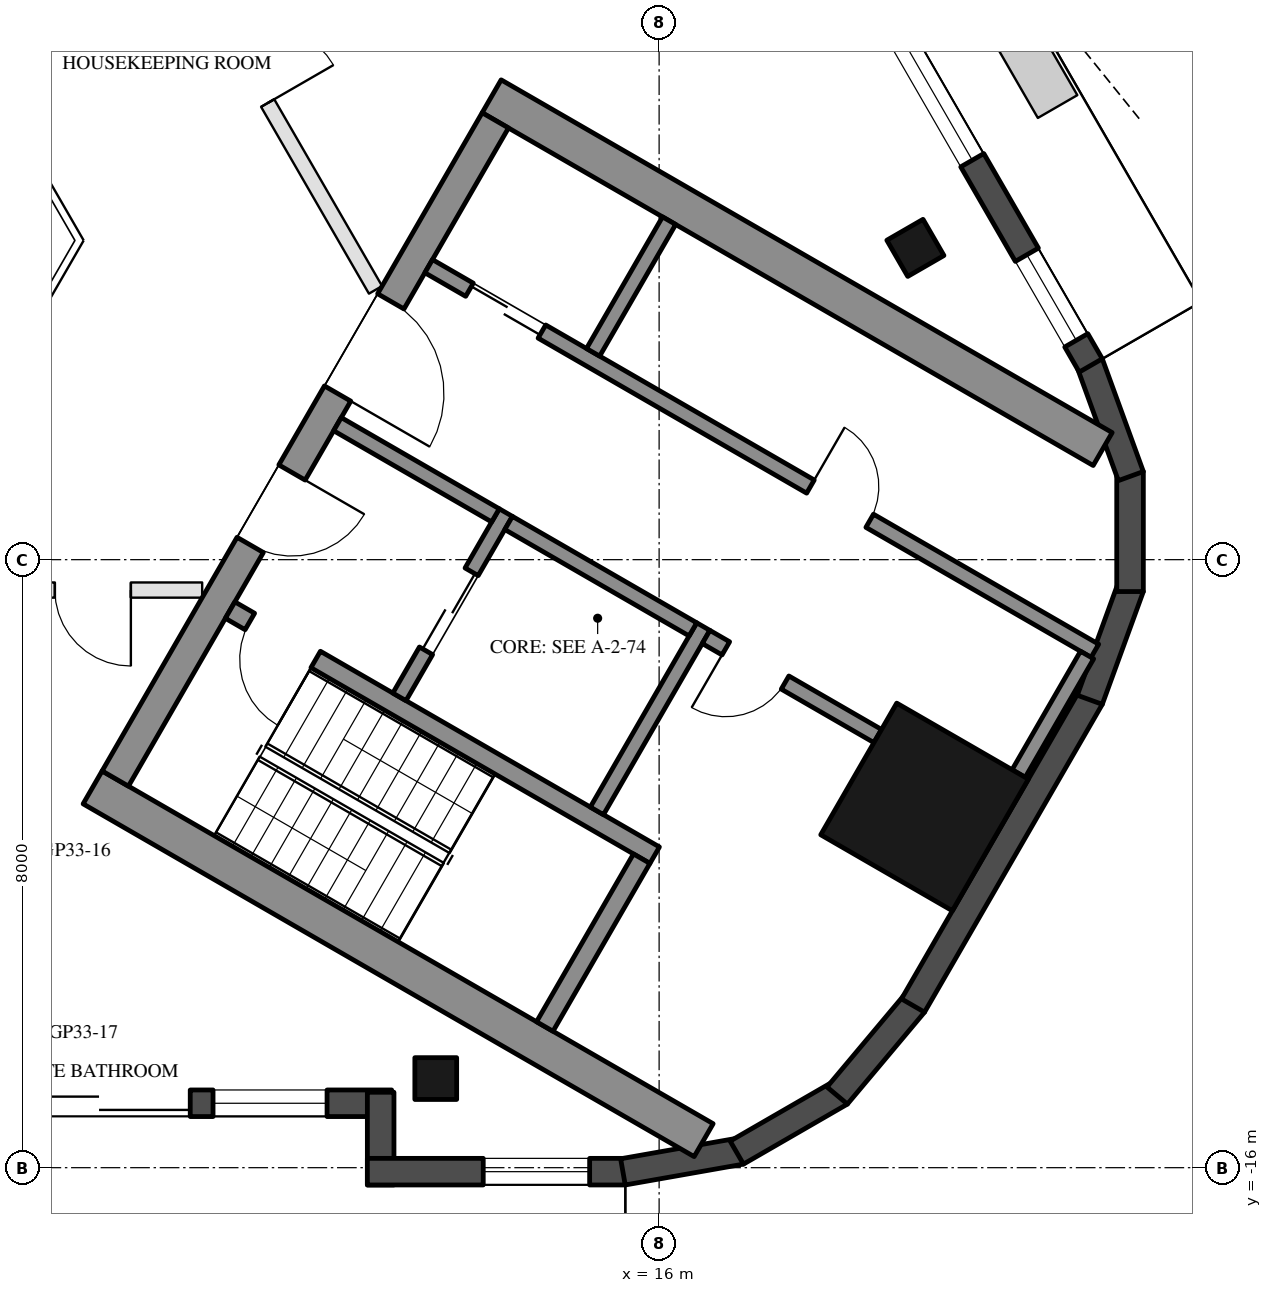
"""IFC4 building model, lengths in metres.
Left out: names, types, materials, properties, quantities, classifications, styles, units other than length and angle.
Written with IfcOpenShell. Run it as: python <this file> out.ifc"""

import sys

from ifc_helpers import new_model, si_unit, direction, frame, frame_2d, origin, origin_2d, place, context, subcontext, project, spatial, rectangle, hollow_rectangle, extrude, boolean, halfspace, element, fill, save


model = new_model("IFC4")
c1 = context("Model", 3, precision=1e-05, world=origin(), true_north=direction((0.0, 1.0)))
c2 = subcontext(c1, "Body", "Model", "MODEL_VIEW")
j1 = project(units=[si_unit("LENGTHUNIT", "METRE"), si_unit("PLANEANGLEUNIT", "RADIAN")], contexts=[c1])
p1 = place(None, origin())
s1 = spatial("IfcSite", under=j1, at=p1, CompositionType="ELEMENT")
p2 = place(p1, origin())
s2 = spatial("IfcBuilding", under=s1, at=p2, CompositionType="ELEMENT")
p3 = place(p2, frame((0.0, 0.0, 317.0)))
s3 = spatial("IfcBuildingStorey", under=s2, at=p3, CompositionType="ELEMENT", Elevation=317.0)
for number, where, z_axis, x_axis in (
    (1, (13.061, -14.827, 0.0), (0.0, 0.0, 1.0), (-1.0, 0.0, 0.0)),
    (2, (19.372, -3.898, 0.0), (0.0, 0.0, 1.0), (-0.5, 0.866, 0.0)),
):
    element("IfcColumn", number, at=place(p3, frame(where, z_axis=z_axis, x_axis=x_axis)), inside=s3, PredefinedType="COLUMN", context=c2, shape_type="SweptSolid", body=[
        boolean("DIFFERENCE", extrude(hollow_rectangle(XDim=0.55, YDim=0.55, WallThickness=0.025, at=origin_2d()), origin(), (0.0, 0.0, 1.0), 3.7), halfspace(frame((0.0, 0.0, 3.66), z_axis=(0.0, 0.0, 1.0), x_axis=(1.0, 0.0, 0.0)), False)),
    ])
p4 = place(p3, frame((19.492, -11.254, 0.0), z_axis=(0.0, 0.0, 1.0), x_axis=(0.5, 0.866025403784, 0.0)))
e3 = element("IfcColumn", 3, at=p4, inside=s3, PredefinedType="COLUMN", context=c2, shape_type="SweptSolid", body=[
    boolean("DIFFERENCE", extrude(hollow_rectangle(XDim=2.0, YDim=2.0, WallThickness=0.05, at=origin_2d()), origin(), (0.0, 0.0, 1.0), 3.7), halfspace(frame((0.0, 0.0, 3.587), z_axis=(0.0, 0.0, 1.0), x_axis=(1.0, 0.0, 0.0)), False)),
])
p5 = place(p3, frame((7.111, -15.153, 0.0), z_axis=(0.0, 0.0, 1.0), x_axis=(1.0, 0.0, 0.0)))
e4 = element("IfcWall", 4, at=p5, inside=s3, PredefinedType="SOLIDWALL", context=c2, shape_type="SweptSolid", body=[
    extrude(rectangle(XDim=5.371, YDim=0.35, at=frame_2d((2.686, 0.0))), origin(), (0.0, 0.0, 1.0), 3.55),
])
p6 = place(p5, frame((0.32, 0.0, 0.0)))
e5 = element("IfcOpeningElement", 5, at=p6, cuts=e4, PredefinedType="OPENING", context=c2, shape_type="SweptSolid", body=[
    extrude(rectangle(XDim=2.4, YDim=2.4, at=frame_2d((1.2, 1.2))), frame((0.0, 0.185, 0.0), z_axis=(0.0, -1.0, 0.0), x_axis=(1.0, 0.0, 0.0)), (0.0, 0.0, 1.0), 0.37),
])
p7 = place(p5, frame((3.021, 0.0, 0.3)))
e6 = element("IfcOpeningElement", 6, at=p7, cuts=e4, PredefinedType="OPENING", context=c2, shape_type="SweptSolid", body=[
    extrude(rectangle(XDim=1.5, YDim=2.65, at=frame_2d((0.75, 1.325))), frame((0.0, 0.185, 0.0), z_axis=(0.0, -1.0, 0.0), x_axis=(1.0, 0.0, 0.0)), (0.0, 0.0, 1.0), 0.37),
])
p8 = place(p3, frame((12.336, -15.008, 0.0), z_axis=(0.0, 0.0, 1.0), x_axis=(0.0, -1.0, 0.0)))
e7 = element("IfcWall", 7, at=p8, inside=s3, PredefinedType="SOLIDWALL", context=c2, shape_type="SweptSolid", body=[
    extrude(rectangle(XDim=1.22, YDim=0.35, at=frame_2d((0.61, 0.0))), origin(), (0.0, 0.0, 1.0), 3.55),
])
p9 = place(p3, frame((12.161, -16.052, 0.0), z_axis=(0.0, 0.0, 1.0), x_axis=(1.0, 0.0, 0.0)))
e8 = element("IfcWall", 8, at=p9, inside=s3, PredefinedType="SOLIDWALL", context=c2, shape_type="SweptSolid", body=[
    extrude(rectangle(XDim=3.393, YDim=0.35, at=frame_2d((1.697, 0.0))), origin(), (0.0, 0.0, 1.0), 3.55),
])
p10 = place(p9, frame((1.524, 0.0, 0.3)))
e9 = element("IfcOpeningElement", 9, at=p10, cuts=e8, PredefinedType="OPENING", context=c2, shape_type="SweptSolid", body=[
    extrude(rectangle(XDim=1.4, YDim=2.65, at=frame_2d((0.7, 1.325))), frame((0.0, 0.185, 0.0), z_axis=(0.0, -1.0, 0.0), x_axis=(1.0, 0.0, 0.0)), (0.0, 0.0, 1.0), 0.37),
])
for number, where, z_axis, x_axis in (
    (10, (15.524, -16.055, 0.0), (0.0, 0.0, 1.0), (0.985, 0.174, 0.0)),
    (11, (17.022, -15.802, 0.0), (0.0, 0.0, 1.0), (0.866, 0.5, 0.0)),
    (12, (18.343, -15.051, 0.0), (0.0, 0.0, 1.0), (0.643, 0.766, 0.0)),
):
    element("IfcWall", number, at=place(p3, frame(where, z_axis=z_axis, x_axis=x_axis)), inside=s3, PredefinedType="SOLIDWALL", context=c2, shape_type="SweptSolid", body=[
        extrude(rectangle(XDim=1.579, YDim=0.35, at=frame_2d((0.79, 0.0))), origin(), (0.0, 0.0, 1.0), 3.55),
    ])
p11 = place(p3, frame((19.34, -13.867, 0.0), z_axis=(0.0, 0.0, 1.0), x_axis=(0.500023656998, 0.86601174498, 0.0)))
e13 = element("IfcWall", 13, at=p11, inside=s3, PredefinedType="SOLIDWALL", context=c2, shape_type="SweptSolid", body=[
    extrude(rectangle(XDim=4.677, YDim=0.35, at=frame_2d((2.339, 0.0))), origin(), (0.0, 0.0, 1.0), 3.55),
])
for number, where, z_axis, x_axis in (
    (14, (21.666, -9.844, 0.0), (0.0, 0.0, 1.0), (0.342, 0.94, 0.0)),
    (15, (22.196, -8.42, 0.0), (0.0, 0.0, 1.0), (0.0, 1.0, 0.0)),
    (16, (22.206, -6.9, 0.0), (0.0, 0.0, 1.0), (-0.342, 0.94, 0.0)),
):
    element("IfcWall", number, at=place(p3, frame(where, z_axis=z_axis, x_axis=x_axis)), inside=s3, PredefinedType="SOLIDWALL", context=c2, shape_type="SweptSolid", body=[
        extrude(rectangle(XDim=1.579, YDim=0.35, at=frame_2d((0.79, 0.0))), origin(), (0.0, 0.0, 1.0), 3.55),
    ])
p12 = place(p3, frame((21.679, -5.444, 0.0), z_axis=(0.0, 0.0, 1.0), x_axis=(-0.500020587865, 0.866013517049, 0.0)))
e17 = element("IfcWall", 17, at=p12, inside=s3, PredefinedType="SOLIDWALL", context=c2, shape_type="SweptSolid", body=[
    extrude(rectangle(XDim=9.924, YDim=0.35, at=frame_2d((4.962, 0.0))), origin(), (0.0, 0.0, 1.0), 3.55),
])
p13 = place(p12, frame((0.381, 0.0, 0.3)))
e18 = element("IfcOpeningElement", 18, at=p13, cuts=e17, PredefinedType="OPENING", context=c2, shape_type="SweptSolid", body=[
    extrude(rectangle(XDim=1.3, YDim=2.65, at=frame_2d((0.65, 1.325))), frame((0.0, 0.185, 0.0), z_axis=(0.0, -1.0, 0.0), x_axis=(1.0, 0.0, 0.0)), (0.0, 0.0, 1.0), 0.37),
])
p14 = place(p12, frame((5.999, 0.0, 0.0)))
e19 = element("IfcOpeningElement", 19, at=p14, cuts=e17, PredefinedType="OPENING", context=c2, shape_type="SweptSolid", body=[
    extrude(rectangle(XDim=2.4, YDim=2.4, at=frame_2d((1.2, 1.2))), frame((0.0, 0.185, 0.0), z_axis=(0.0, -1.0, 0.0), x_axis=(1.0, 0.0, 0.0)), (0.0, 0.0, 1.0), 0.37),
])
p15 = place(p12, frame((3.118, 0.0, 0.3)))
e20 = element("IfcOpeningElement", 20, at=p15, cuts=e17, PredefinedType="OPENING", context=c2, shape_type="SweptSolid", body=[
    extrude(rectangle(XDim=2.5, YDim=2.65, at=frame_2d((1.25, 1.325))), frame((0.0, 0.185, 0.0), z_axis=(0.0, -1.0, 0.0), x_axis=(1.0, 0.0, 0.0)), (0.0, 0.0, 1.0), 0.37),
])
for number, where, z_axis, x_axis in (
    (21, (8.547, -10.997, 0.0), (0.0, 0.0, 1.0), (0.866, -0.5, 0.0)),
    (22, (13.797, -1.903, 0.0), (0.0, 0.0, 1.0), (0.866, -0.5, 0.0)),
):
    element("IfcWall", number, at=place(p3, frame(where, z_axis=z_axis, x_axis=x_axis)), inside=s3, PredefinedType="SHEAR", context=c2, shape_type="SweptSolid", body=[
        extrude(rectangle(XDim=9.283, YDim=0.5, at=frame_2d((4.641, 0.0))), origin(), (0.0, 0.0, 1.0), 3.5),
    ])
p16 = place(p3, frame((8.845, -10.88, 0.0), z_axis=(0.0, 0.0, 1.0), x_axis=(0.500004234368, 0.866022959057, 0.0)))
e23 = element("IfcWall", 23, at=p16, inside=s3, PredefinedType="SHEAR", context=c2, shape_type="SweptSolid", body=[
    extrude(rectangle(XDim=10.0, YDim=0.4, at=frame_2d((5.0, 0.0))), origin(), (0.0, 0.0, 1.0), 3.5),
])
p17 = place(p16, frame((3.55, 0.0, 0.0)))
e24 = element("IfcOpeningElement", 24, at=p17, cuts=e23, PredefinedType="OPENING", context=c2, shape_type="SweptSolid", body=[
    extrude(rectangle(XDim=1.1, YDim=2.1, at=frame_2d((0.55, 1.05))), frame((0.0, 0.21, 0.0), z_axis=(0.0, -1.0, 0.0), x_axis=(1.0, 0.0, 0.0)), (0.0, 0.0, 1.0), 0.42),
])
p18 = place(p16, frame((5.85, 0.0, 0.0)))
e25 = element("IfcOpeningElement", 25, at=p18, cuts=e23, PredefinedType="OPENING", context=c2, shape_type="SweptSolid", body=[
    extrude(rectangle(XDim=1.4, YDim=2.1, at=frame_2d((0.7, 1.05))), frame((0.0, 0.21, 0.0), z_axis=(0.0, -1.0, 0.0), x_axis=(1.0, 0.0, 0.0)), (0.0, 0.0, 1.0), 0.42),
])
p19 = place(p3, frame((10.356, -8.664, 0.0), z_axis=(0.0, 0.0, 1.0), x_axis=(0.866028629588, -0.499994412703, 0.0)))
e26 = element("IfcWall", 26, at=p19, inside=s3, PredefinedType="SHEAR", context=c2, shape_type="SweptSolid", body=[
    extrude(rectangle(XDim=6.45, YDim=0.25, at=frame_2d((3.225, 0.0))), origin(), (0.0, 0.0, 1.0), 3.5),
])
p20 = place(p19, frame((0.3, 0.0, 0.0)))
e27 = element("IfcOpeningElement", 27, at=p20, cuts=e26, PredefinedType="OPENING", context=c2, shape_type="SweptSolid", body=[
    extrude(rectangle(XDim=1.0, YDim=2.1, at=frame_2d((0.5, 1.05))), frame((0.0, 0.135, 0.0), z_axis=(0.0, -1.0, 0.0), x_axis=(1.0, 0.0, 0.0)), (0.0, 0.0, 1.0), 0.27),
])
p21 = place(p3, frame((14.496, -14.143, 0.0), z_axis=(0.0, 0.0, 1.0), x_axis=(0.500062241894, 0.865989465428, 0.0)))
e28 = element("IfcWall", 28, at=p21, inside=s3, PredefinedType="SHEAR", context=c2, shape_type="SweptSolid", body=[
    extrude(rectangle(XDim=2.55, YDim=0.25, at=frame_2d((1.275, 0.0))), origin(), (0.0, 0.0, 1.0), 3.5),
])
p22 = place(p3, frame((15.181, -11.305, 0.0), z_axis=(0.0, 0.0, 1.0), x_axis=(0.49994636267, 0.866056369097, 0.0)))
e29 = element("IfcWall", 29, at=p22, inside=s3, PredefinedType="SHEAR", context=c2, shape_type="SweptSolid", body=[
    extrude(rectangle(XDim=2.8, YDim=0.2, at=frame_2d((1.4, 0.0))), origin(), (0.0, 0.0, 1.0), 3.5),
])
p23 = place(p3, frame((12.583, -9.805, 0.0), z_axis=(0.0, 0.0, 1.0), x_axis=(0.49994636267, 0.866056369097, 0.0)))
e30 = element("IfcWall", 30, at=p23, inside=s3, PredefinedType="SHEAR", context=c2, shape_type="SweptSolid", body=[
    extrude(rectangle(XDim=2.8, YDim=0.2, at=frame_2d((1.4, 0.0))), origin(), (0.0, 0.0, 1.0), 3.5),
])
p24 = place(p23, frame((0.7, 0.0, 0.0)))
e31 = element("IfcOpeningElement", 31, at=p24, cuts=e30, PredefinedType="OPENING", context=c2, shape_type="SweptSolid", body=[
    extrude(rectangle(XDim=1.2, YDim=2.1, at=frame_2d((0.6, 1.05))), frame((0.0, 0.11, 0.0), z_axis=(0.0, -1.0, 0.0), x_axis=(1.0, 0.0, 0.0)), (0.0, 0.0, 1.0), 0.22),
])
p25 = place(p3, frame((11.768, -6.217, 0.0), z_axis=(0.0, 0.0, 1.0), x_axis=(0.866050077142, -0.499957262057, 0.0)))
e32 = element("IfcWall", 32, at=p25, inside=s3, PredefinedType="SHEAR", context=c2, shape_type="SweptSolid", body=[
    extrude(rectangle(XDim=2.4, YDim=0.2, at=frame_2d((1.2, 0.0))), origin(), (0.0, 0.0, 1.0), 3.5),
])
p26 = place(p3, frame((14.02, -7.517, 0.0), z_axis=(0.0, 0.0, 1.0), x_axis=(0.866034573852, -0.49998411664, 0.0)))
e33 = element("IfcWall", 33, at=p26, inside=s3, PredefinedType="SHEAR", context=c2, shape_type="SweptSolid", body=[
    extrude(rectangle(XDim=2.8, YDim=0.2, at=frame_2d((1.4, 0.0))), origin(), (0.0, 0.0, 1.0), 3.5),
])
p27 = place(p3, frame((12.968, -4.138, 0.0), z_axis=(0.0, 0.0, 1.0), x_axis=(0.866025710499, -0.499999468754, 0.0)))
e34 = element("IfcWall", 34, at=p27, inside=s3, PredefinedType="SHEAR", context=c2, shape_type="SweptSolid", body=[
    extrude(rectangle(XDim=10.121, YDim=0.2, at=frame_2d((5.061, 0.0))), origin(), (0.0, 0.0, 1.0), 3.5),
])
p28 = place(p27, frame((0.62, 0.0, 0.0)))
e35 = element("IfcOpeningElement", 35, at=p28, cuts=e34, PredefinedType="OPENING", context=c2, shape_type="SweptSolid", body=[
    extrude(rectangle(XDim=1.1, YDim=2.1, at=frame_2d((0.55, 1.05))), frame((0.0, 0.11, 0.0), z_axis=(0.0, -1.0, 0.0), x_axis=(1.0, 0.0, 0.0)), (0.0, 0.0, 1.0), 0.22),
])
p29 = place(p27, frame((5.8, 0.0, 0.0)))
e36 = element("IfcOpeningElement", 36, at=p29, cuts=e34, PredefinedType="OPENING", context=c2, shape_type="SweptSolid", body=[
    extrude(rectangle(XDim=0.9, YDim=2.1, at=frame_2d((0.45, 1.05))), frame((0.0, 0.11, 0.0), z_axis=(0.0, -1.0, 0.0), x_axis=(1.0, 0.0, 0.0)), (0.0, 0.0, 1.0), 0.22),
])
p30 = place(p3, frame((20.73, -10.814, 0.0), z_axis=(0.0, 0.0, 1.0), x_axis=(0.499961193289, 0.866047807691, 0.0)))
e37 = element("IfcWall", 37, at=p30, inside=s3, PredefinedType="SHEAR", context=c2, shape_type="SweptSolid", body=[
    extrude(rectangle(XDim=1.8, YDim=0.2, at=frame_2d((0.9, 0.0))), origin(), (0.0, 0.0, 1.0), 3.5),
])
p31 = place(p3, frame((16.618, -9.017, 0.0), z_axis=(0.0, 0.0, 1.0), x_axis=(0.866045268016, -0.499965592563, 0.0)))
e38 = element("IfcWall", 38, at=p31, inside=s3, PredefinedType="SHEAR", context=c2, shape_type="SweptSolid", body=[
    extrude(rectangle(XDim=2.608, YDim=0.2, at=frame_2d((1.304, 0.0))), origin(), (0.0, 0.0, 1.0), 3.5),
])
p32 = place(p31, frame((0.3, 0.0, 0.0)))
e39 = element("IfcOpeningElement", 39, at=p32, cuts=e38, PredefinedType="OPENING", context=c2, shape_type="SweptSolid", body=[
    extrude(rectangle(XDim=0.9, YDim=2.1, at=frame_2d((0.45, 1.05))), frame((0.0, 0.11, 0.0), z_axis=(0.0, -1.0, 0.0), x_axis=(1.0, 0.0, 0.0)), (0.0, 0.0, 1.0), 0.22),
])
p33 = place(p3, frame((15.131, -5.272, 0.0), z_axis=(0.0, 0.0, 1.0), x_axis=(0.499972520799, 0.866041268327, 0.0)))
e40 = element("IfcWall", 40, at=p33, inside=s3, PredefinedType="SHEAR", context=c2, shape_type="SweptSolid", body=[
    extrude(rectangle(XDim=2.0, YDim=0.2, at=frame_2d((1.0, 0.0))), origin(), (0.0, 0.0, 1.0), 3.5),
])
p34 = place(p3, frame((9.988, -8.4, 0.0), z_axis=(0.0, 0.0, 1.0), x_axis=(-1.0, 0.0, 0.0)))
e41 = element("IfcWall", 41, at=p34, inside=s3, PredefinedType="PARTITIONING", context=c2, shape_type="SweptSolid", body=[
    extrude(rectangle(XDim=4.388, YDim=0.2, at=frame_2d((2.194, 0.0))), origin(), (0.0, 0.0, 1.0), 3.1),
])
p35 = place(p34, frame((0.938, 0.0, 0.0)))
e42 = element("IfcOpeningElement", 42, at=p35, cuts=e41, PredefinedType="OPENING", context=c2, shape_type="SweptSolid", body=[
    extrude(rectangle(XDim=1.0, YDim=2.1, at=frame_2d((0.5, 1.05))), frame((0.0, 0.11, 0.0), z_axis=(0.0, -1.0, 0.0), x_axis=(1.0, 0.0, 0.0)), (0.0, 0.0, 1.0), 0.22),
])
p36 = place(p3, frame((9.127, 0.992, 0.0), z_axis=(0.0, 0.0, 1.0), x_axis=(0.500012817413, -0.866018003521, 0.0)))
e43 = element("IfcWall", 43, at=p36, inside=s3, PredefinedType="PARTITIONING", context=c2, shape_type="SweptSolid", body=[
    extrude(rectangle(XDim=6.283, YDim=0.2, at=frame_2d((3.142, 0.0))), origin(), (0.0, 0.0, 1.0), 3.1),
])
p37 = place(p36, frame((2.446, 0.0, 0.0)))
e44 = element("IfcOpeningElement", 44, at=p37, cuts=e43, PredefinedType="OPENING", context=c2, shape_type="SweptSolid", body=[
    extrude(rectangle(XDim=1.0, YDim=2.1, at=frame_2d((0.5, 1.05))), frame((0.0, 0.11, 0.0), z_axis=(0.0, -1.0, 0.0), x_axis=(1.0, 0.0, 0.0)), (0.0, 0.0, 1.0), 0.22),
])
p38 = place(p6, frame((2.4, 0.0, 0.0), z_axis=(0.0, 0.0, 1.0), x_axis=(-1.0, 0.0, 0.0)))
e45 = element("IfcDoor", 45, at=p38, inside=s3, OperationType="SLIDING_TO_LEFT", PredefinedType="DOOR", context=c2, shape_type="SweptSolid", body=[
    extrude(rectangle(XDim=2.4, YDim=2.4, at=frame_2d((1.2, 1.2))), frame((0.0, 0.025, 0.0), z_axis=(0.0, -1.0, 0.0), x_axis=(1.0, 0.0, 0.0)), (0.0, 0.0, 1.0), 0.05),
])
fill(e5, e45)
p39 = place(p7, origin())
e46 = element("IfcWindow", 46, at=p39, inside=s3, PartitioningType="SINGLE_PANEL", PredefinedType="WINDOW", context=c2, shape_type="SweptSolid", body=[
    extrude(rectangle(XDim=1.5, YDim=2.65, at=frame_2d((0.75, 1.325))), frame((0.0, 0.03, 0.0), z_axis=(0.0, -1.0, 0.0), x_axis=(1.0, 0.0, 0.0)), (0.0, 0.0, 1.0), 0.06),
])
fill(e6, e46)
p40 = place(p10, origin())
e47 = element("IfcWindow", 47, at=p40, inside=s3, PartitioningType="SINGLE_PANEL", PredefinedType="WINDOW", context=c2, shape_type="SweptSolid", body=[
    extrude(rectangle(XDim=1.4, YDim=2.65, at=frame_2d((0.7, 1.325))), frame((0.0, 0.03, 0.0), z_axis=(0.0, -1.0, 0.0), x_axis=(1.0, 0.0, 0.0)), (0.0, 0.0, 1.0), 0.06),
])
fill(e9, e47)
p41 = place(p13, origin())
e48 = element("IfcWindow", 48, at=p41, inside=s3, PartitioningType="SINGLE_PANEL", PredefinedType="WINDOW", context=c2, shape_type="SweptSolid", body=[
    extrude(rectangle(XDim=1.3, YDim=2.65, at=frame_2d((0.65, 1.325))), frame((0.0, 0.03, 0.0), z_axis=(0.0, -1.0, 0.0), x_axis=(1.0, 0.0, 0.0)), (0.0, 0.0, 1.0), 0.06),
])
fill(e18, e48)
p42 = place(p15, origin())
e49 = element("IfcWindow", 49, at=p42, inside=s3, PartitioningType="SINGLE_PANEL", PredefinedType="WINDOW", context=c2, shape_type="SweptSolid", body=[
    extrude(rectangle(XDim=2.5, YDim=2.65, at=frame_2d((1.25, 1.325))), frame((0.0, 0.03, 0.0), z_axis=(0.0, -1.0, 0.0), x_axis=(1.0, 0.0, 0.0)), (0.0, 0.0, 1.0), 0.06),
])
fill(e20, e49)
p43 = place(p24, origin())
e50 = element("IfcDoor", 50, at=p43, inside=s3, OperationType="DOUBLE_DOOR_SLIDING", PredefinedType="DOOR", context=c2, shape_type="SweptSolid", body=[
    extrude(rectangle(XDim=1.2, YDim=2.1, at=frame_2d((0.6, 1.05))), frame((0.0, 0.025, 0.0), z_axis=(0.0, -1.0, 0.0), x_axis=(1.0, 0.0, 0.0)), (0.0, 0.0, 1.0), 0.05),
])
fill(e31, e50)
p44 = place(p28, origin())
e51 = element("IfcDoor", 51, at=p44, inside=s3, OperationType="DOUBLE_DOOR_SLIDING", PredefinedType="DOOR", context=c2, shape_type="SweptSolid", body=[
    extrude(rectangle(XDim=1.1, YDim=2.1, at=frame_2d((0.55, 1.05))), frame((0.0, 0.025, 0.0), z_axis=(0.0, -1.0, 0.0), x_axis=(1.0, 0.0, 0.0)), (0.0, 0.0, 1.0), 0.05),
])
fill(e35, e51)
p45 = place(p29, origin())
e52 = element("IfcDoor", 52, at=p45, inside=s3, OperationType="SINGLE_SWING_LEFT", PredefinedType="DOOR", context=c2, shape_type="SweptSolid", body=[
    extrude(rectangle(XDim=0.9, YDim=2.1, at=frame_2d((0.45, 1.05))), frame((0.0, 0.025, 0.0), z_axis=(0.0, -1.0, 0.0), x_axis=(1.0, 0.0, 0.0)), (0.0, 0.0, 1.0), 0.05),
])
fill(e36, e52)
p46 = place(p32, frame((0.9, 0.0, 0.0), z_axis=(0.0, 0.0, 1.0), x_axis=(-1.0, 0.0, 0.0)))
e53 = element("IfcDoor", 53, at=p46, inside=s3, OperationType="SINGLE_SWING_RIGHT", PredefinedType="DOOR", context=c2, shape_type="SweptSolid", body=[
    extrude(rectangle(XDim=0.9, YDim=2.1, at=frame_2d((0.45, 1.05))), frame((0.0, 0.025, 0.0), z_axis=(0.0, -1.0, 0.0), x_axis=(1.0, 0.0, 0.0)), (0.0, 0.0, 1.0), 0.05),
])
fill(e39, e53)
p47 = place(p17, frame((1.1, 0.0, 0.0), z_axis=(0.0, 0.0, 1.0), x_axis=(-1.0, 0.0, 0.0)))
e54 = element("IfcDoor", 54, at=p47, inside=s3, OperationType="SINGLE_SWING_LEFT", PredefinedType="DOOR", context=c2, shape_type="SweptSolid", body=[
    extrude(rectangle(XDim=1.1, YDim=2.1, at=frame_2d((0.55, 1.05))), frame((0.0, 0.025, 0.0), z_axis=(0.0, -1.0, 0.0), x_axis=(1.0, 0.0, 0.0)), (0.0, 0.0, 1.0), 0.05),
])
fill(e24, e54)
p48 = place(p18, frame((1.4, 0.0, 0.0), z_axis=(0.0, 0.0, 1.0), x_axis=(-1.0, 0.0, 0.0)))
e55 = element("IfcDoor", 55, at=p48, inside=s3, OperationType="DOUBLE_DOOR_SINGLE_SWING", PredefinedType="DOOR", context=c2, shape_type="SweptSolid", body=[
    extrude(rectangle(XDim=1.4, YDim=2.1, at=frame_2d((0.7, 1.05))), frame((0.0, 0.025, 0.0), z_axis=(0.0, -1.0, 0.0), x_axis=(1.0, 0.0, 0.0)), (0.0, 0.0, 1.0), 0.05),
])
fill(e25, e55)
p49 = place(p20, frame((1.0, 0.0, 0.0), z_axis=(0.0, 0.0, 1.0), x_axis=(-1.0, 0.0, 0.0)))
e56 = element("IfcDoor", 56, at=p49, inside=s3, OperationType="SINGLE_SWING_LEFT", PredefinedType="DOOR", context=c2, shape_type="SweptSolid", body=[
    extrude(rectangle(XDim=1.0, YDim=2.1, at=frame_2d((0.5, 1.05))), frame((0.0, 0.025, 0.0), z_axis=(0.0, -1.0, 0.0), x_axis=(1.0, 0.0, 0.0)), (0.0, 0.0, 1.0), 0.05),
])
fill(e27, e56)
p50 = place(p35, origin())
e57 = element("IfcDoor", 57, at=p50, inside=s3, OperationType="SINGLE_SWING_LEFT", PredefinedType="DOOR", context=c2, shape_type="SweptSolid", body=[
    extrude(rectangle(XDim=1.0, YDim=2.1, at=frame_2d((0.5, 1.05))), frame((0.0, 0.025, 0.0), z_axis=(0.0, -1.0, 0.0), x_axis=(1.0, 0.0, 0.0)), (0.0, 0.0, 1.0), 0.05),
])
fill(e42, e57)
p51 = place(p37, origin())
e58 = element("IfcDoor", 58, at=p51, inside=s3, OperationType="SINGLE_SWING_RIGHT", PredefinedType="DOOR", context=c2, shape_type="SweptSolid", body=[
    extrude(rectangle(XDim=1.0, YDim=2.1, at=frame_2d((0.5, 1.05))), frame((0.0, 0.025, 0.0), z_axis=(0.0, -1.0, 0.0), x_axis=(1.0, 0.0, 0.0)), (0.0, 0.0, 1.0), 0.05),
])
fill(e44, e58)
save(model, sys.argv[1])
